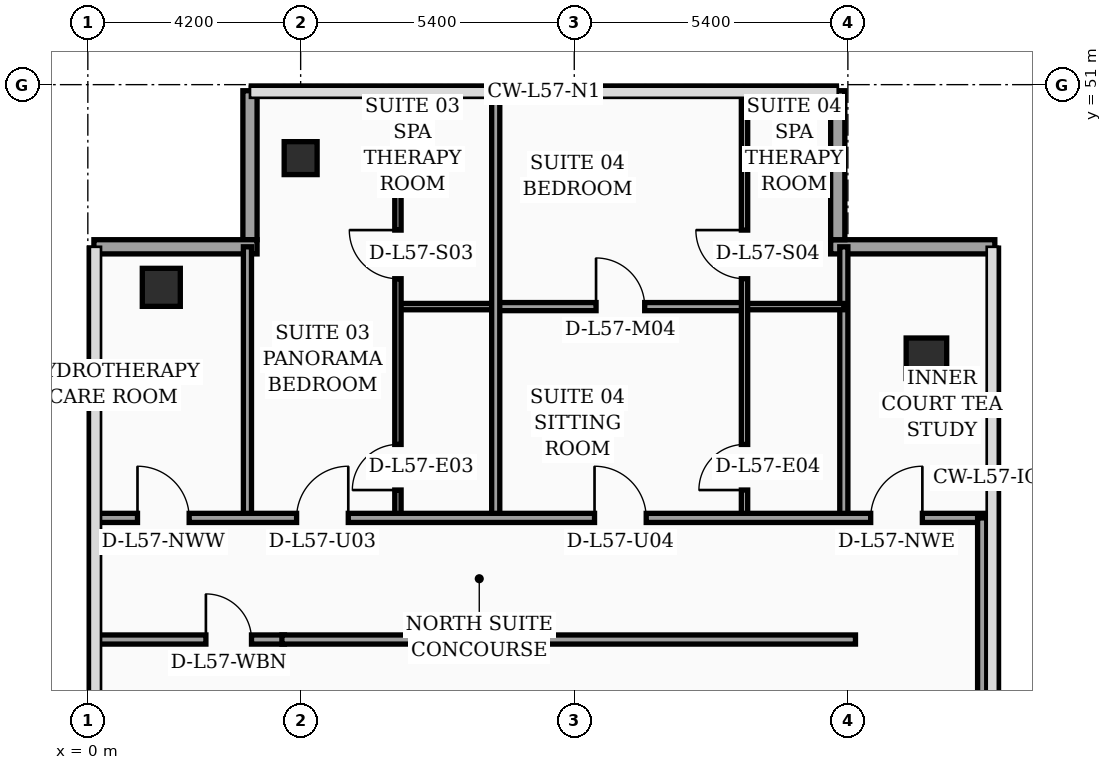
"""IFC4 building model, lengths in metres.
Left out: names, types, materials, properties, quantities, classifications, styles, units other than length and angle.
Written with IfcOpenShell. Run it as: python <this file> out.ifc"""

import sys

from ifc_helpers import new_model, si_unit, direction, frame, frame_2d, origin, origin_2d, place, context, subcontext, project, spatial, rectangle, hollow_rectangle, extrude, element, fill, save


model = new_model("IFC4")
c1 = context("Model", 3, precision=1e-05, world=origin(), true_north=direction((0.0, 1.0)))
c2 = subcontext(c1, "Body", "Model", "MODEL_VIEW")
j1 = project(units=[si_unit("LENGTHUNIT", "METRE"), si_unit("PLANEANGLEUNIT", "RADIAN")], contexts=[c1])
p1 = place(None, origin())
s1 = spatial("IfcSite", under=j1, at=p1, CompositionType="ELEMENT")
p2 = place(p1, origin())
s2 = spatial("IfcBuilding", under=s1, at=p2, CompositionType="ELEMENT")
p3 = place(p2, frame((0.0, 0.0, 230.7)))
s3 = spatial("IfcBuildingStorey", under=s2, at=p3, CompositionType="ELEMENT", Elevation=230.7)
p4 = place(p3, frame((1.45, 47.0, 0.0), z_axis=(0.0, 0.0, 1.0), x_axis=(1.0, 0.0, 0.0)))
e1 = element("IfcColumn", 1, at=p4, inside=s3, PredefinedType="COLUMN", context=c2, shape_type="SweptSolid", body=[
    extrude(hollow_rectangle(XDim=0.75, YDim=0.75, WallThickness=0.032, at=origin_2d()), origin(), (0.0, 0.0, 1.0), 3.52),
])
p5 = place(p3, frame((4.2, 49.55, 0.0), z_axis=(0.0, 0.0, 1.0), x_axis=(1.0, 0.0, 0.0)))
e2 = element("IfcColumn", 2, at=p5, inside=s3, PredefinedType="COLUMN", context=c2, shape_type="SweptSolid", body=[
    extrude(hollow_rectangle(XDim=0.65, YDim=0.65, WallThickness=0.028, at=origin_2d()), origin(), (0.0, 0.0, 1.0), 3.52),
])
p6 = place(p3, frame((16.55, 45.6, 0.0), z_axis=(0.0, 0.0, 1.0), x_axis=(1.0, 0.0, 0.0)))
e3 = element("IfcColumn", 3, at=p6, inside=s3, PredefinedType="COLUMN", context=c2, shape_type="SweptSolid", body=[
    extrude(rectangle(XDim=0.8, YDim=0.8, at=origin_2d()), origin(), (0.0, 0.0, 1.0), 3.52),
])
p7 = place(p3, frame((17.9, 47.8, 0.0), z_axis=(0.0, 0.0, 1.0), x_axis=(-1.0, 0.0, 0.0)))
e4 = element("IfcWall", 4, at=p7, inside=s3, PredefinedType="SOLIDWALL", context=c2, shape_type="SweptSolid", body=[
    extrude(rectangle(XDim=3.24, YDim=0.28, at=frame_2d((1.62, 0.0))), origin(), (0.0, 0.0, 1.0), 3.52),
])
p8 = place(p3, frame((14.8, 47.94, 0.0), z_axis=(0.0, 0.0, 1.0), x_axis=(0.0, 1.0, 0.0)))
e5 = element("IfcWall", 5, at=p8, inside=s3, PredefinedType="SOLIDWALL", context=c2, shape_type="SweptSolid", body=[
    extrude(rectangle(XDim=2.94, YDim=0.28, at=frame_2d((1.47, 0.0))), origin(), (0.0, 0.0, 1.0), 3.52),
])
p9 = place(p3, frame((3.2, 50.88, 0.0), z_axis=(0.0, 0.0, 1.0), x_axis=(0.0, -1.0, 0.0)))
e6 = element("IfcWall", 6, at=p9, inside=s3, PredefinedType="SOLIDWALL", context=c2, shape_type="SweptSolid", body=[
    extrude(rectangle(XDim=2.94, YDim=0.28, at=frame_2d((1.47, 0.0))), origin(), (0.0, 0.0, 1.0), 3.07),
])
p10 = place(p3, frame((3.34, 47.8, 0.0), z_axis=(0.0, 0.0, 1.0), x_axis=(-1.0, 0.0, 0.0)))
e7 = element("IfcWall", 7, at=p10, inside=s3, PredefinedType="SOLIDWALL", context=c2, shape_type="SweptSolid", body=[
    extrude(rectangle(XDim=3.22, YDim=0.28, at=frame_2d((1.61, 0.0))), origin(), (0.0, 0.0, 1.0), 3.07),
])
p11 = place(p3, frame((0.08, 40.05, 0.0), z_axis=(0.0, 0.0, 1.0), x_axis=(1.0, 0.0, 0.0)))
e8 = element("IfcWall", 8, at=p11, inside=s3, PredefinedType="PARTITIONING", context=c2, shape_type="SweptSolid", body=[
    extrude(rectangle(XDim=3.8, YDim=0.18, at=frame_2d((1.9, 0.0))), origin(), (0.0, 0.0, 1.0), 2.92),
])
p12 = place(p11, frame((2.25, 0.0, 0.0)))
e9 = element("IfcOpeningElement", 9, at=p12, cuts=e8, PredefinedType="OPENING", context=c2, shape_type="SweptSolid", body=[
    extrude(rectangle(XDim=0.9, YDim=2.15, at=frame_2d((0.45, 1.075))), frame((0.0, 0.1, 0.0), z_axis=(0.0, -1.0, 0.0), x_axis=(1.0, 0.0, 0.0)), (0.0, 0.0, 1.0), 0.2),
])
p13 = place(p3, frame((3.15, 42.45, 0.0), z_axis=(0.0, 0.0, 1.0), x_axis=(0.0, 1.0, 0.0)))
e10 = element("IfcWall", 10, at=p13, inside=s3, PredefinedType="PARTITIONING", context=c2, shape_type="SweptSolid", body=[
    extrude(rectangle(XDim=5.35, YDim=0.16, at=frame_2d((2.675, 0.0))), origin(), (0.0, 0.0, 1.0), 3.12),
])
p14 = place(p3, frame((14.92, 42.45, 0.0), z_axis=(0.0, 0.0, 1.0), x_axis=(0.0, 1.0, 0.0)))
e11 = element("IfcWall", 11, at=p14, inside=s3, PredefinedType="PARTITIONING", context=c2, shape_type="SweptSolid", body=[
    extrude(rectangle(XDim=5.35, YDim=0.16, at=frame_2d((2.675, 0.0))), origin(), (0.0, 0.0, 1.0), 3.07),
])
p15 = place(p3, frame((6.12, 46.62, 0.0), z_axis=(0.0, 0.0, 1.0), x_axis=(1.0, 0.0, 0.0)))
e12 = element("IfcWall", 12, at=p15, inside=s3, PredefinedType="PARTITIONING", context=c2, shape_type="SweptSolid", body=[
    extrude(rectangle(XDim=1.93, YDim=0.125, at=frame_2d((0.965, 0.0))), origin(), (0.0, 0.0, 1.0), 3.52),
])
p16 = place(p3, frame((6.12, 42.45, 0.0), z_axis=(0.0, 0.0, 1.0), x_axis=(0.0, 1.0, 0.0)))
e13 = element("IfcWall", 13, at=p16, inside=s3, PredefinedType="PARTITIONING", context=c2, shape_type="SweptSolid", body=[
    extrude(rectangle(XDim=8.49, YDim=0.125, at=frame_2d((4.245, 0.0))), origin(), (0.0, 0.0, 1.0), 3.07),
])
p17 = place(p16, frame((0.55, 0.0, 0.0)))
e14 = element("IfcOpeningElement", 14, at=p17, cuts=e13, PredefinedType="OPENING", context=c2, shape_type="SweptSolid", body=[
    extrude(rectangle(XDim=0.9, YDim=2.15, at=frame_2d((0.45, 1.075))), frame((0.0, 0.073, 0.0), z_axis=(0.0, -1.0, 0.0), x_axis=(1.0, 0.0, 0.0)), (0.0, 0.0, 1.0), 0.145),
])
p18 = place(p16, frame((4.72, 0.0, 0.0)))
e15 = element("IfcOpeningElement", 15, at=p18, cuts=e13, PredefinedType="OPENING", context=c2, shape_type="SweptSolid", body=[
    extrude(rectangle(XDim=0.96, YDim=2.2, at=frame_2d((0.48, 1.1))), frame((0.0, 0.073, 0.0), z_axis=(0.0, -1.0, 0.0), x_axis=(1.0, 0.0, 0.0)), (0.0, 0.0, 1.0), 0.145),
])
p19 = place(p3, frame((12.96, 46.62, 0.0), z_axis=(0.0, 0.0, 1.0), x_axis=(1.0, 0.0, 0.0)))
e16 = element("IfcWall", 16, at=p19, inside=s3, PredefinedType="PARTITIONING", context=c2, shape_type="SweptSolid", body=[
    extrude(rectangle(XDim=1.96, YDim=0.125, at=frame_2d((0.98, 0.0))), origin(), (0.0, 0.0, 1.0), 3.07),
])
p20 = place(p3, frame((8.05, 46.62, 0.0), z_axis=(0.0, 0.0, 1.0), x_axis=(1.0, 0.0, 0.0)))
e17 = element("IfcWall", 17, at=p20, inside=s3, PredefinedType="PARTITIONING", context=c2, shape_type="SweptSolid", body=[
    extrude(rectangle(XDim=4.91, YDim=0.16, at=frame_2d((2.455, 0.0))), origin(), (0.0, 0.0, 1.0), 3.07),
])
p21 = place(p20, frame((1.98, 0.0, 0.0)))
e18 = element("IfcOpeningElement", 18, at=p21, cuts=e17, PredefinedType="OPENING", context=c2, shape_type="SweptSolid", body=[
    extrude(rectangle(XDim=0.96, YDim=2.2, at=frame_2d((0.48, 1.1))), frame((0.0, 0.09, 0.0), z_axis=(0.0, -1.0, 0.0), x_axis=(1.0, 0.0, 0.0)), (0.0, 0.0, 1.0), 0.18),
])
p22 = place(p3, frame((12.96, 42.45, 0.0), z_axis=(0.0, 0.0, 1.0), x_axis=(0.0, 1.0, 0.0)))
e19 = element("IfcWall", 19, at=p22, inside=s3, PredefinedType="PARTITIONING", context=c2, shape_type="SweptSolid", body=[
    extrude(rectangle(XDim=8.49, YDim=0.125, at=frame_2d((4.245, 0.0))), origin(), (0.0, 0.0, 1.0), 3.07),
])
p23 = place(p22, frame((0.55, 0.0, 0.0)))
e20 = element("IfcOpeningElement", 20, at=p23, cuts=e19, PredefinedType="OPENING", context=c2, shape_type="SweptSolid", body=[
    extrude(rectangle(XDim=0.9, YDim=2.15, at=frame_2d((0.45, 1.075))), frame((0.0, 0.073, 0.0), z_axis=(0.0, -1.0, 0.0), x_axis=(1.0, 0.0, 0.0)), (0.0, 0.0, 1.0), 0.145),
])
p24 = place(p22, frame((4.72, 0.0, 0.0)))
e21 = element("IfcOpeningElement", 21, at=p24, cuts=e19, PredefinedType="OPENING", context=c2, shape_type="SweptSolid", body=[
    extrude(rectangle(XDim=0.96, YDim=2.2, at=frame_2d((0.48, 1.1))), frame((0.0, 0.073, 0.0), z_axis=(0.0, -1.0, 0.0), x_axis=(1.0, 0.0, 0.0)), (0.0, 0.0, 1.0), 0.145),
])
p25 = place(p3, frame((8.05, 42.45, 0.0), z_axis=(0.0, 0.0, 1.0), x_axis=(0.0, 1.0, 0.0)))
e22 = element("IfcWall", 22, at=p25, inside=s3, PredefinedType="PARTITIONING", context=c2, shape_type="SweptSolid", body=[
    extrude(rectangle(XDim=8.49, YDim=0.16, at=frame_2d((4.245, 0.0))), origin(), (0.0, 0.0, 1.0), 3.07),
])
p26 = place(p3, frame((0.08, 42.45, 0.0), z_axis=(0.0, 0.0, 1.0), x_axis=(1.0, 0.0, 0.0)))
e23 = element("IfcWall", 23, at=p26, inside=s3, PredefinedType="PARTITIONING", context=c2, shape_type="SweptSolid", body=[
    extrude(rectangle(XDim=17.77, YDim=0.18, at=frame_2d((8.885, 0.0))), origin(), (0.0, 0.0, 1.0), 2.92),
])
p27 = place(p26, frame((0.9, 0.0, 0.0)))
e24 = element("IfcOpeningElement", 24, at=p27, cuts=e23, PredefinedType="OPENING", context=c2, shape_type="SweptSolid", body=[
    extrude(rectangle(XDim=1.02, YDim=2.2, at=frame_2d((0.51, 1.1))), frame((0.0, 0.1, 0.0), z_axis=(0.0, -1.0, 0.0), x_axis=(1.0, 0.0, 0.0)), (0.0, 0.0, 1.0), 0.2),
])
p28 = place(p26, frame((4.04, 0.0, 0.0)))
e25 = element("IfcOpeningElement", 25, at=p28, cuts=e23, PredefinedType="OPENING", context=c2, shape_type="SweptSolid", body=[
    extrude(rectangle(XDim=1.02, YDim=2.2, at=frame_2d((0.51, 1.1))), frame((0.0, 0.1, 0.0), z_axis=(0.0, -1.0, 0.0), x_axis=(1.0, 0.0, 0.0)), (0.0, 0.0, 1.0), 0.2),
])
p29 = place(p26, frame((9.92, 0.0, 0.0)))
e26 = element("IfcOpeningElement", 26, at=p29, cuts=e23, PredefinedType="OPENING", context=c2, shape_type="SweptSolid", body=[
    extrude(rectangle(XDim=1.02, YDim=2.2, at=frame_2d((0.51, 1.1))), frame((0.0, 0.1, 0.0), z_axis=(0.0, -1.0, 0.0), x_axis=(1.0, 0.0, 0.0)), (0.0, 0.0, 1.0), 0.2),
])
p30 = place(p26, frame((15.37, 0.0, 0.0)))
e27 = element("IfcOpeningElement", 27, at=p30, cuts=e23, PredefinedType="OPENING", context=c2, shape_type="SweptSolid", body=[
    extrude(rectangle(XDim=1.02, YDim=2.2, at=frame_2d((0.51, 1.1))), frame((0.0, 0.1, 0.0), z_axis=(0.0, -1.0, 0.0), x_axis=(1.0, 0.0, 0.0)), (0.0, 0.0, 1.0), 0.2),
])
p31 = place(p3, frame((17.65, 24.3, 0.0), z_axis=(0.0, 0.0, 1.0), x_axis=(0.0, 1.0, 0.0)))
e28 = element("IfcWall", 28, at=p31, inside=s3, PredefinedType="PARTITIONING", context=c2, shape_type="SweptSolid", body=[
    extrude(rectangle(XDim=18.15, YDim=0.18, at=frame_2d((9.075, 0.0))), origin(), (0.0, 0.0, 1.0), 2.92),
])
p32 = place(p31, frame((3.2, 0.0, 0.0)))
e29 = element("IfcOpeningElement", 29, at=p32, cuts=e28, PredefinedType="OPENING", context=c2, shape_type="SweptSolid", body=[
    extrude(rectangle(XDim=1.02, YDim=2.2, at=frame_2d((0.51, 1.1))), frame((0.0, 0.1, 0.0), z_axis=(0.0, -1.0, 0.0), x_axis=(1.0, 0.0, 0.0)), (0.0, 0.0, 1.0), 0.2),
])
p33 = place(p3, frame((3.83, 40.05, 0.0), z_axis=(0.0, 0.0, 1.0), x_axis=(1.0, 0.0, 0.0)))
e30 = element("IfcWall", 30, at=p33, inside=s3, PredefinedType="PARTITIONING", context=c2, shape_type="SweptSolid", body=[
    extrude(rectangle(XDim=11.32, YDim=0.18, at=frame_2d((5.66, 0.0))), origin(), (0.0, 0.0, 1.0), 2.92),
])
p34 = place(p12, origin())
e31 = element("IfcDoor", 31, at=p34, inside=s3, OperationType="SINGLE_SWING_LEFT", PredefinedType="DOOR", context=c2, shape_type="SweptSolid", body=[
    extrude(rectangle(XDim=0.9, YDim=2.15, at=frame_2d((0.45, 1.075))), frame((0.0, 0.025, 0.0), z_axis=(0.0, -1.0, 0.0), x_axis=(1.0, 0.0, 0.0)), (0.0, 0.0, 1.0), 0.05),
])
fill(e9, e31)
p35 = place(p17, origin())
e32 = element("IfcDoor", 32, at=p35, inside=s3, OperationType="SINGLE_SWING_LEFT", PredefinedType="DOOR", context=c2, shape_type="SweptSolid", body=[
    extrude(rectangle(XDim=0.9, YDim=2.15, at=frame_2d((0.45, 1.075))), frame((0.0, 0.025, 0.0), z_axis=(0.0, -1.0, 0.0), x_axis=(1.0, 0.0, 0.0)), (0.0, 0.0, 1.0), 0.05),
])
fill(e14, e32)
p36 = place(p18, origin())
e33 = element("IfcDoor", 33, at=p36, inside=s3, OperationType="SINGLE_SWING_RIGHT", PredefinedType="DOOR", context=c2, shape_type="SweptSolid", body=[
    extrude(rectangle(XDim=0.96, YDim=2.2, at=frame_2d((0.48, 1.1))), frame((0.0, 0.025, 0.0), z_axis=(0.0, -1.0, 0.0), x_axis=(1.0, 0.0, 0.0)), (0.0, 0.0, 1.0), 0.05),
])
fill(e15, e33)
p37 = place(p21, origin())
e34 = element("IfcDoor", 34, at=p37, inside=s3, OperationType="SINGLE_SWING_LEFT", PredefinedType="DOOR", context=c2, shape_type="SweptSolid", body=[
    extrude(rectangle(XDim=0.96, YDim=2.2, at=frame_2d((0.48, 1.1))), frame((0.0, 0.025, 0.0), z_axis=(0.0, -1.0, 0.0), x_axis=(1.0, 0.0, 0.0)), (0.0, 0.0, 1.0), 0.05),
])
fill(e18, e34)
p38 = place(p23, origin())
e35 = element("IfcDoor", 35, at=p38, inside=s3, OperationType="SINGLE_SWING_LEFT", PredefinedType="DOOR", context=c2, shape_type="SweptSolid", body=[
    extrude(rectangle(XDim=0.9, YDim=2.15, at=frame_2d((0.45, 1.075))), frame((0.0, 0.025, 0.0), z_axis=(0.0, -1.0, 0.0), x_axis=(1.0, 0.0, 0.0)), (0.0, 0.0, 1.0), 0.05),
])
fill(e20, e35)
p39 = place(p24, origin())
e36 = element("IfcDoor", 36, at=p39, inside=s3, OperationType="SINGLE_SWING_RIGHT", PredefinedType="DOOR", context=c2, shape_type="SweptSolid", body=[
    extrude(rectangle(XDim=0.96, YDim=2.2, at=frame_2d((0.48, 1.1))), frame((0.0, 0.025, 0.0), z_axis=(0.0, -1.0, 0.0), x_axis=(1.0, 0.0, 0.0)), (0.0, 0.0, 1.0), 0.05),
])
fill(e21, e36)
p40 = place(p27, origin())
e37 = element("IfcDoor", 37, at=p40, inside=s3, OperationType="SINGLE_SWING_LEFT", PredefinedType="DOOR", context=c2, shape_type="SweptSolid", body=[
    extrude(rectangle(XDim=1.02, YDim=2.2, at=frame_2d((0.51, 1.1))), frame((0.0, 0.025, 0.0), z_axis=(0.0, -1.0, 0.0), x_axis=(1.0, 0.0, 0.0)), (0.0, 0.0, 1.0), 0.05),
])
fill(e24, e37)
p41 = place(p28, origin())
e38 = element("IfcDoor", 38, at=p41, inside=s3, OperationType="SINGLE_SWING_RIGHT", PredefinedType="DOOR", context=c2, shape_type="SweptSolid", body=[
    extrude(rectangle(XDim=1.02, YDim=2.2, at=frame_2d((0.51, 1.1))), frame((0.0, 0.025, 0.0), z_axis=(0.0, -1.0, 0.0), x_axis=(1.0, 0.0, 0.0)), (0.0, 0.0, 1.0), 0.05),
])
fill(e25, e38)
p42 = place(p29, origin())
e39 = element("IfcDoor", 39, at=p42, inside=s3, OperationType="SINGLE_SWING_LEFT", PredefinedType="DOOR", context=c2, shape_type="SweptSolid", body=[
    extrude(rectangle(XDim=1.02, YDim=2.2, at=frame_2d((0.51, 1.1))), frame((0.0, 0.025, 0.0), z_axis=(0.0, -1.0, 0.0), x_axis=(1.0, 0.0, 0.0)), (0.0, 0.0, 1.0), 0.05),
])
fill(e26, e39)
p43 = place(p30, origin())
e40 = element("IfcDoor", 40, at=p43, inside=s3, OperationType="SINGLE_SWING_RIGHT", PredefinedType="DOOR", context=c2, shape_type="SweptSolid", body=[
    extrude(rectangle(XDim=1.02, YDim=2.2, at=frame_2d((0.51, 1.1))), frame((0.0, 0.025, 0.0), z_axis=(0.0, -1.0, 0.0), x_axis=(1.0, 0.0, 0.0)), (0.0, 0.0, 1.0), 0.05),
])
fill(e27, e40)
save(model, sys.argv[1])
